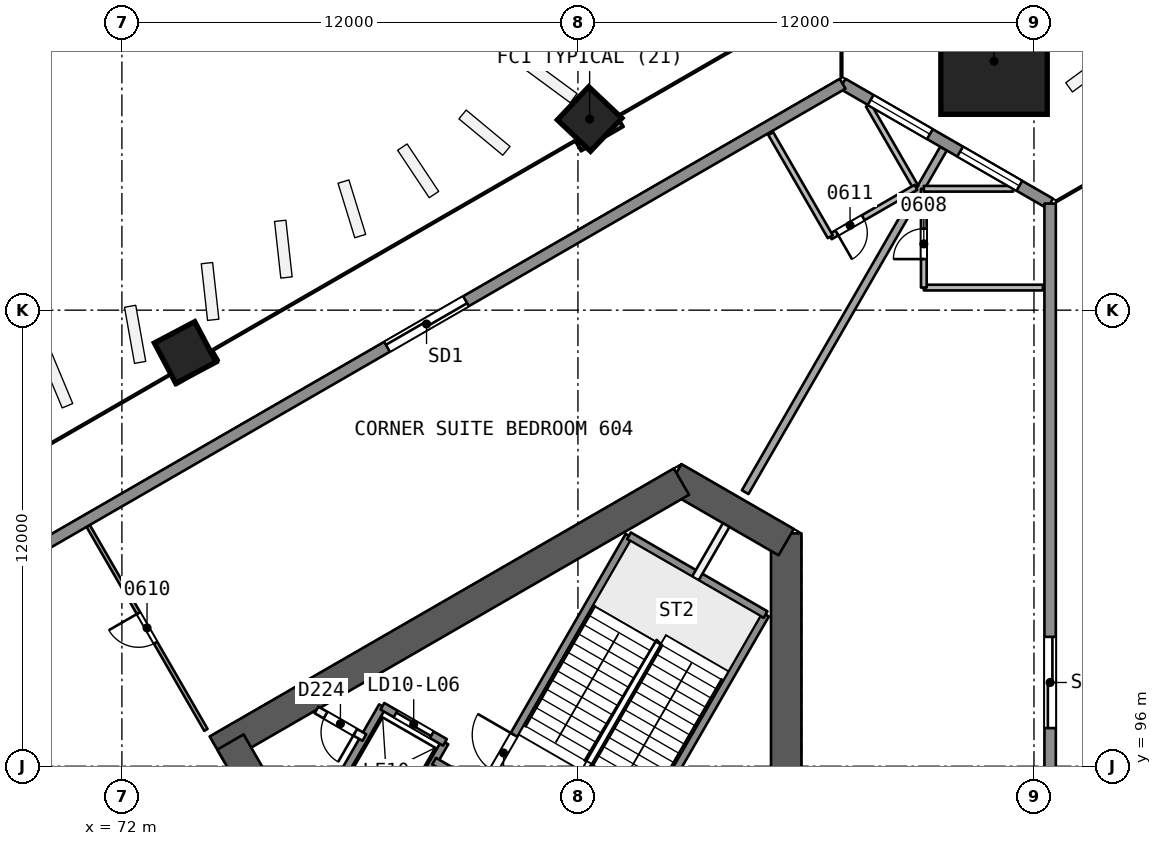
"""IFC4 building model, lengths in metres.
Left out: names, types, materials, properties, quantities, classifications, styles, units other than length and angle.
Written with IfcOpenShell. Run it as: python <this file> out.ifc"""

import sys

from ifc_helpers import new_model, si_unit, direction, frame, frame_2d, origin, origin_2d, place, context, subcontext, project, spatial, rectangle, extrude, element, fill, save


model = new_model("IFC4")
c1 = context("Model", 3, precision=1e-05, world=origin(), true_north=direction((0.0, 1.0)))
c2 = subcontext(c1, "Body", "Model", "MODEL_VIEW")
j1 = project(units=[si_unit("LENGTHUNIT", "METRE"), si_unit("PLANEANGLEUNIT", "RADIAN")], contexts=[c1])
p1 = place(None, origin())
s1 = spatial("IfcSite", under=j1, at=p1, CompositionType="ELEMENT")
p2 = place(p1, origin())
s2 = spatial("IfcBuilding", under=s1, at=p2, CompositionType="ELEMENT")
p3 = place(p2, frame((0.0, 0.0, 33.7)))
s3 = spatial("IfcBuildingStorey", under=s2, at=p3, CompositionType="ELEMENT", Elevation=33.7)
p4 = place(p3, frame((89.48, 88.194, 0.0), z_axis=(0.0, 0.0, 1.0), x_axis=(0.0, 1.0, 0.0)))
e1 = element("IfcWall", 1, at=p4, inside=s3, PredefinedType="SHEAR", context=c2, shape_type="SweptSolid", body=[
    extrude(rectangle(XDim=13.933, YDim=0.8, at=frame_2d((6.967, 0.0))), origin(), (0.0, 0.0, 1.0), 3.7),
])
p5 = place(p3, frame((89.48, 101.897, 0.0), z_axis=(0.0, 0.0, 1.0), x_axis=(-0.866034355626, 0.499984494636, 0.0)))
e2 = element("IfcWall", 2, at=p5, inside=s3, PredefinedType="SHEAR", context=c2, shape_type="SweptSolid", body=[
    extrude(rectangle(XDim=3.414, YDim=0.8, at=frame_2d((1.707, 0.0))), origin(), (0.0, 0.0, 1.0), 3.7),
])
p6 = place(p3, frame((86.723, 103.488, 0.0), z_axis=(0.0, 0.0, 1.0), x_axis=(-0.866032504327, -0.499987701298, 0.0)))
e3 = element("IfcWall", 3, at=p6, inside=s3, PredefinedType="SHEAR", context=c2, shape_type="SweptSolid", body=[
    extrude(rectangle(XDim=14.102, YDim=0.8, at=frame_2d((7.051, 0.0))), origin(), (0.0, 0.0, 1.0), 3.7),
])
p7 = place(p3, frame((74.856, 96.637, 0.0), z_axis=(0.0, 0.0, 1.0), x_axis=(0.499993500917, -0.866029155999, 0.0)))
e4 = element("IfcWall", 4, at=p7, inside=s3, PredefinedType="SHEAR", context=c2, shape_type="SweptSolid", body=[
    extrude(rectangle(XDim=9.98, YDim=0.8, at=frame_2d((4.99, 0.0))), origin(), (0.0, 0.0, 1.0), 3.7),
])
p8 = place(p7, frame((7.83, 0.0, 0.0)))
e5 = element("IfcOpeningElement", 5, at=p8, cuts=e4, PredefinedType="OPENING", context=c2, shape_type="SweptSolid", body=[
    extrude(rectangle(XDim=1.2, YDim=2.1, at=frame_2d((0.6, 1.05))), frame((0.0, 0.411, 0.0), z_axis=(0.0, -1.0, 0.0), x_axis=(1.0, 0.0, 0.0)), (0.0, 0.0, 1.0), 0.821),
])
p9 = place(p3, frame((94.97, 114.59, 0.0), z_axis=(-0.017607001884, -0.030531992032, 0.999378702468), x_axis=(0.866279052578, -0.499560409824, 2.461e-09)))
e6 = element("IfcColumn", 6, at=p9, inside=s3, PredefinedType="COLUMN", context=c2, shape_type="SweptSolid", body=[
    extrude(rectangle(XDim=2.8, YDim=2.8, at=origin_2d()), origin(), (0.0, 0.0, 1.0), 3.702),
])
p10 = place(p3, frame((84.318, 113.064, 0.0), z_axis=(-0.00837646992, -0.028097450282, 0.999570091609), x_axis=(0.866168540849, 0.499298149106, 0.021293593943)))
e7 = element("IfcColumn", 7, at=p10, inside=s3, PredefinedType="COLUMN", context=c2, shape_type="SweptSolid", body=[
    extrude(rectangle(XDim=1.2, YDim=1.2, at=origin_2d()), origin(), (0.0, 0.0, 1.0), 3.702),
])
p11 = place(p3, frame((73.665, 106.914, 0.0), z_axis=(0.000857578916, -0.022824792675, 0.999739112668), x_axis=(0.866054303765, 0.499836094294, 0.010668728649)))
e8 = element("IfcColumn", 8, at=p11, inside=s3, PredefinedType="COLUMN", context=c2, shape_type="SweptSolid", body=[
    extrude(rectangle(XDim=1.2, YDim=1.2, at=origin_2d()), origin(), (0.0, 0.0, 1.0), 3.701),
])
p12 = place(p3, frame((96.235, 108.594, 0.0), z_axis=(0.0, 0.0, 1.0), x_axis=(-1.0, 0.0, 0.0)))
e9 = element("IfcWall", 9, at=p12, inside=s3, PredefinedType="PARTITIONING", context=c2, shape_type="SweptSolid", body=[
    extrude(rectangle(XDim=3.134, YDim=0.15, at=frame_2d((1.567, 0.0))), origin(), (0.0, 0.0, 1.0), 3.2),
])
p13 = place(p3, frame((93.102, 108.594, 0.0), z_axis=(0.0, 0.0, 1.0), x_axis=(0.0, 1.0, 0.0)))
e10 = element("IfcWall", 10, at=p13, inside=s3, PredefinedType="PARTITIONING", context=c2, shape_type="SweptSolid", body=[
    extrude(rectangle(XDim=2.6, YDim=0.15, at=frame_2d((1.3, 0.0))), origin(), (0.0, 0.0, 1.0), 3.2),
])
p14 = place(p13, frame((0.75, 0.0, 0.0)))
e11 = element("IfcOpeningElement", 11, at=p14, cuts=e10, PredefinedType="OPENING", context=c2, shape_type="SweptSolid", body=[
    extrude(rectangle(XDim=0.8, YDim=2.1, at=frame_2d((0.4, 1.05))), frame((0.0, 0.085, 0.0), z_axis=(0.0, -1.0, 0.0), x_axis=(1.0, 0.0, 0.0)), (0.0, 0.0, 1.0), 0.171),
])
p15 = place(p3, frame((93.102, 111.194, 0.0), z_axis=(0.0, 0.0, 1.0), x_axis=(1.0, 0.0, 0.0)))
e12 = element("IfcWall", 12, at=p15, inside=s3, PredefinedType="PARTITIONING", context=c2, shape_type="SweptSolid", body=[
    extrude(rectangle(XDim=2.352, YDim=0.15, at=frame_2d((1.176, 0.0))), origin(), (0.0, 0.0, 1.0), 3.2),
])
p16 = place(p3, frame((93.621, 112.252, 0.0), z_axis=(0.0, 0.0, 1.0), x_axis=(-0.499992367345, -0.866029810455, 0.0)))
e13 = element("IfcWall", 13, at=p16, inside=s3, PredefinedType="PARTITIONING", context=c2, shape_type="SweptSolid", body=[
    extrude(rectangle(XDim=10.44, YDim=0.2, at=frame_2d((5.22, 0.0))), origin(), (0.0, 0.0, 1.0), 3.2),
])
p17 = place(p3, frame((74.21, 96.956, 0.0), z_axis=(0.0, 0.0, 1.0), x_axis=(-0.499986163319, 0.866033392248, 0.0)))
e14 = element("IfcWall", 14, at=p17, inside=s3, PredefinedType="PARTITIONING", context=c2, shape_type="SweptSolid", body=[
    extrude(rectangle(XDim=6.198, YDim=0.1, at=frame_2d((3.099, 0.0))), origin(), (0.0, 0.0, 1.0), 3.2),
])
p18 = place(p17, frame((2.649, 0.0, 0.0)))
e15 = element("IfcOpeningElement", 15, at=p18, cuts=e14, PredefinedType="OPENING", context=c2, shape_type="SweptSolid", body=[
    extrude(rectangle(XDim=0.9, YDim=2.1, at=frame_2d((0.45, 1.05))), frame((0.0, 0.061, 0.0), z_axis=(0.0, -1.0, 0.0), x_axis=(1.0, 0.0, 0.0)), (0.0, 0.0, 1.0), 0.121),
])
p19 = place(p3, frame((65.712, 99.205, 0.0), z_axis=(0.0, 0.0, 1.0), x_axis=(0.499997249004, -0.866026992067, 0.0)))
e16 = element("IfcWall", 16, at=p19, inside=s3, PredefinedType="PARTITIONING", context=c2, shape_type="SweptSolid", body=[
    extrude(rectangle(XDim=14.176, YDim=0.2, at=frame_2d((7.088, 0.0))), origin(), (0.0, 0.0, 1.0), 3.2),
])
p20 = place(p3, frame((91.644, 113.393, 0.0), z_axis=(0.0, 0.0, 1.0), x_axis=(0.500021675881, -0.866012888847, 0.0)))
e17 = element("IfcWall", 17, at=p20, inside=s3, PredefinedType="PARTITIONING", context=c2, shape_type="SweptSolid", body=[
    extrude(rectangle(XDim=2.496, YDim=0.15, at=frame_2d((1.248, 0.0))), origin(), (0.0, 0.0, 1.0), 3.2),
])
p21 = place(p3, frame((92.892, 111.232, 0.0), z_axis=(0.0, 0.0, 1.0), x_axis=(-0.866021400173, -0.500006934395, 0.0)))
e18 = element("IfcWall", 18, at=p21, inside=s3, PredefinedType="PARTITIONING", context=c2, shape_type="SweptSolid", body=[
    extrude(rectangle(XDim=2.6, YDim=0.15, at=frame_2d((1.3, 0.0))), origin(), (0.0, 0.0, 1.0), 3.2),
])
p22 = place(p21, frame((1.6, 0.0, 0.0)))
e19 = element("IfcOpeningElement", 19, at=p22, cuts=e18, PredefinedType="OPENING", context=c2, shape_type="SweptSolid", body=[
    extrude(rectangle(XDim=0.8, YDim=2.1, at=frame_2d((0.4, 1.05))), frame((0.0, 0.085, 0.0), z_axis=(0.0, -1.0, 0.0), x_axis=(1.0, 0.0, 0.0)), (0.0, 0.0, 1.0), 0.171),
])
p23 = place(p3, frame((90.64, 109.932, 0.0), z_axis=(0.0, 0.0, 1.0), x_axis=(-0.499951757484, 0.866053254822, 0.0)))
e20 = element("IfcWall", 20, at=p23, inside=s3, PredefinedType="PARTITIONING", context=c2, shape_type="SweptSolid", body=[
    extrude(rectangle(XDim=3.134, YDim=0.15, at=frame_2d((1.567, 0.0))), origin(), (0.0, 0.0, 1.0), 3.2),
])
p24 = place(p3, frame((90.965, 113.957, 0.0), z_axis=(0.0, 0.0, 1.0), x_axis=(0.866032760736, -0.49998725717, 0.0)))
e21 = element("IfcWall", 21, at=p24, inside=s3, PredefinedType="SOLIDWALL", context=c2, shape_type="SweptSolid", body=[
    extrude(rectangle(XDim=6.305, YDim=0.3, at=frame_2d((3.152, 0.0))), origin(), (0.0, 0.0, 1.0), 3.2),
])
p25 = place(p24, frame((3.57, 0.0, 0.9)))
e22 = element("IfcOpeningElement", 22, at=p25, cuts=e21, PredefinedType="OPENING", context=c2, shape_type="SweptSolid", body=[
    extrude(rectangle(XDim=1.8, YDim=1.5, at=frame_2d((0.9, 0.75))), frame((0.0, 0.161, 0.0), z_axis=(0.0, -1.0, 0.0), x_axis=(1.0, 0.0, 0.0)), (0.0, 0.0, 1.0), 0.321),
])
p26 = place(p24, frame((0.852, 0.0, 0.9)))
e23 = element("IfcOpeningElement", 23, at=p26, cuts=e21, PredefinedType="OPENING", context=c2, shape_type="SweptSolid", body=[
    extrude(rectangle(XDim=1.8, YDim=1.5, at=frame_2d((0.9, 0.75))), frame((0.0, 0.161, 0.0), z_axis=(0.0, -1.0, 0.0), x_axis=(1.0, 0.0, 0.0)), (0.0, 0.0, 1.0), 0.321),
])
p27 = place(p3, frame((96.425, 110.805, 0.0), z_axis=(0.0, 0.0, 1.0), x_axis=(0.0, -1.0, 0.0)))
e24 = element("IfcWall", 24, at=p27, inside=s3, PredefinedType="SOLIDWALL", context=c2, shape_type="SweptSolid", body=[
    extrude(rectangle(XDim=61.61, YDim=0.3, at=frame_2d((30.805, 0.0))), origin(), (0.0, 0.0, 1.0), 3.2),
])
p28 = place(p27, frame((29.605, 0.0, 0.0)))
e25 = element("IfcOpeningElement", 25, at=p28, cuts=e24, PredefinedType="OPENING", context=c2, shape_type="SweptSolid", body=[
    extrude(rectangle(XDim=2.4, YDim=2.4, at=frame_2d((1.2, 1.2))), frame((0.0, 0.161, 0.0), z_axis=(0.0, -1.0, 0.0), x_axis=(1.0, 0.0, 0.0)), (0.0, 0.0, 1.0), 0.321),
])
p29 = place(p27, frame((34.437, 0.0, 0.0)))
e26 = element("IfcOpeningElement", 26, at=p29, cuts=e24, PredefinedType="OPENING", context=c2, shape_type="SweptSolid", body=[
    extrude(rectangle(XDim=2.4, YDim=2.4, at=frame_2d((1.2, 1.2))), frame((0.0, 0.161, 0.0), z_axis=(0.0, -1.0, 0.0), x_axis=(1.0, 0.0, 0.0)), (0.0, 0.0, 1.0), 0.321),
])
p30 = place(p27, frame((47.767, 0.0, 0.0)))
e27 = element("IfcOpeningElement", 27, at=p30, cuts=e24, PredefinedType="OPENING", context=c2, shape_type="SweptSolid", body=[
    extrude(rectangle(XDim=2.4, YDim=2.4, at=frame_2d((1.2, 1.2))), frame((0.0, 0.161, 0.0), z_axis=(0.0, -1.0, 0.0), x_axis=(1.0, 0.0, 0.0)), (0.0, 0.0, 1.0), 0.321),
])
p31 = place(p27, frame((24.772, 0.0, 0.0)))
e28 = element("IfcOpeningElement", 28, at=p31, cuts=e24, PredefinedType="OPENING", context=c2, shape_type="SweptSolid", body=[
    extrude(rectangle(XDim=2.4, YDim=2.4, at=frame_2d((1.2, 1.2))), frame((0.0, 0.161, 0.0), z_axis=(0.0, -1.0, 0.0), x_axis=(1.0, 0.0, 0.0)), (0.0, 0.0, 1.0), 0.321),
])
p32 = place(p27, frame((11.402, 0.0, 0.0)))
e29 = element("IfcOpeningElement", 29, at=p32, cuts=e24, PredefinedType="OPENING", context=c2, shape_type="SweptSolid", body=[
    extrude(rectangle(XDim=2.4, YDim=2.4, at=frame_2d((1.2, 1.2))), frame((0.0, 0.161, 0.0), z_axis=(0.0, -1.0, 0.0), x_axis=(1.0, 0.0, 0.0)), (0.0, 0.0, 1.0), 0.321),
])
p33 = place(p3, frame((37.61, 83.152, 0.0), z_axis=(0.0, 0.0, 1.0), x_axis=(0.866024438126, 0.500001672566, 0.0)))
e30 = element("IfcWall", 30, at=p33, inside=s3, PredefinedType="SOLIDWALL", context=c2, shape_type="SweptSolid", body=[
    extrude(rectangle(XDim=61.61, YDim=0.3, at=frame_2d((30.805, 0.0))), origin(), (0.0, 0.0, 1.0), 3.2),
])
p34 = place(p33, frame((34.281, 0.0, 0.0)))
e31 = element("IfcOpeningElement", 31, at=p34, cuts=e30, PredefinedType="OPENING", context=c2, shape_type="SweptSolid", body=[
    extrude(rectangle(XDim=2.4, YDim=2.4, at=frame_2d((1.2, 1.2))), frame((0.0, 0.161, 0.0), z_axis=(0.0, -1.0, 0.0), x_axis=(1.0, 0.0, 0.0)), (0.0, 0.0, 1.0), 0.321),
])
p35 = place(p33, frame((47.767, 0.0, 0.0)))
e32 = element("IfcOpeningElement", 32, at=p35, cuts=e30, PredefinedType="OPENING", context=c2, shape_type="SweptSolid", body=[
    extrude(rectangle(XDim=2.4, YDim=2.4, at=frame_2d((1.2, 1.2))), frame((0.0, 0.161, 0.0), z_axis=(0.0, -1.0, 0.0), x_axis=(1.0, 0.0, 0.0)), (0.0, 0.0, 1.0), 0.321),
])
p36 = place(p33, frame((24.305, 0.0, 0.0)))
e33 = element("IfcOpeningElement", 33, at=p36, cuts=e30, PredefinedType="OPENING", context=c2, shape_type="SweptSolid", body=[
    extrude(rectangle(XDim=2.4, YDim=2.4, at=frame_2d((1.2, 1.2))), frame((0.0, 0.161, 0.0), z_axis=(0.0, -1.0, 0.0), x_axis=(1.0, 0.0, 0.0)), (0.0, 0.0, 1.0), 0.321),
])
p37 = place(p33, frame((11.402, 0.0, 0.0)))
e34 = element("IfcOpeningElement", 34, at=p37, cuts=e30, PredefinedType="OPENING", context=c2, shape_type="SweptSolid", body=[
    extrude(rectangle(XDim=2.4, YDim=2.4, at=frame_2d((1.2, 1.2))), frame((0.0, 0.161, 0.0), z_axis=(0.0, -1.0, 0.0), x_axis=(1.0, 0.0, 0.0)), (0.0, 0.0, 1.0), 0.321),
])
p38 = place(p33, frame((28.981, 0.0, 0.0)))
e35 = element("IfcOpeningElement", 35, at=p38, cuts=e30, PredefinedType="OPENING", context=c2, shape_type="SweptSolid", body=[
    extrude(rectangle(XDim=2.4, YDim=2.4, at=frame_2d((1.2, 1.2))), frame((0.0, 0.161, 0.0), z_axis=(0.0, -1.0, 0.0), x_axis=(1.0, 0.0, 0.0)), (0.0, 0.0, 1.0), 0.321),
])
p39 = place(p3, frame((85.087, 93.321, 0.0), z_axis=(0.0, 0.0, 1.0), x_axis=(0.500019787375, 0.866013979237, 0.0)))
e36 = element("IfcWall", 36, at=p39, inside=s3, PredefinedType="SOLIDWALL", context=c2, shape_type="SweptSolid", body=[
    extrude(rectangle(XDim=7.7, YDim=0.2, at=frame_2d((3.85, 0.0))), origin(), (0.0, 0.0, 1.0), 3.2),
])
p40 = place(p3, frame((87.09, 100.94, 0.0), z_axis=(0.0, 0.0, 1.0), x_axis=(0.499956811548, 0.866050337213, 0.0)))
e37 = element("IfcWall", 37, at=p40, inside=s3, PredefinedType="PARTITIONING", context=c2, shape_type="SweptSolid", body=[
    extrude(rectangle(XDim=1.623, YDim=0.2, at=frame_2d((0.812, 0.0))), origin(), (0.0, 0.0, 1.0), 3.2),
])
p41 = place(p3, frame((81.493, 95.396, 0.0), z_axis=(0.0, 0.0, 1.0), x_axis=(0.500006057782, 0.866021906294, 0.0)))
e38 = element("IfcWall", 38, at=p41, inside=s3, PredefinedType="SOLIDWALL", context=c2, shape_type="SweptSolid", body=[
    extrude(rectangle(XDim=7.7, YDim=0.2, at=frame_2d((3.85, 0.0))), origin(), (0.0, 0.0, 1.0), 3.2),
])
p42 = place(p41, frame((0.55, 0.0, 0.0)))
e39 = element("IfcOpeningElement", 39, at=p42, cuts=e38, PredefinedType="OPENING", context=c2, shape_type="SweptSolid", body=[
    extrude(rectangle(XDim=1.1, YDim=2.1, at=frame_2d((0.55, 1.05))), frame((0.0, 0.11, 0.0), z_axis=(0.0, -1.0, 0.0), x_axis=(1.0, 0.0, 0.0)), (0.0, 0.0, 1.0), 0.221),
])
for number, where, z_axis, x_axis in (
    (40, (78.976, 93.986, 0.0), (0.0, 0.0, 1.0), (0.5, 0.866, 0.0)),
    (41, (77.33, 94.936, 0.0), (0.0, 0.0, 1.0), (0.5, 0.866, 0.0)),
):
    element("IfcWall", number, at=place(p3, frame(where, z_axis=z_axis, x_axis=x_axis)), inside=s3, PredefinedType="SOLIDWALL", context=c2, shape_type="SweptSolid", body=[
        extrude(rectangle(XDim=3.05, YDim=0.2, at=frame_2d((1.525, 0.0))), origin(), (0.0, 0.0, 1.0), 3.2),
    ])
p43 = place(p3, frame((78.38, 96.755, 0.0), z_axis=(0.0, 0.0, 1.0), x_axis=(-0.866003949776, 0.500037157592, 0.0)))
e42 = element("IfcWall", 42, at=p43, inside=s3, PredefinedType="PARTITIONING", context=c2, shape_type="SweptSolid", body=[
    extrude(rectangle(XDim=1.455, YDim=0.2, at=frame_2d((0.728, 0.0))), origin(), (0.0, 0.0, 1.0), 3.2),
])
p44 = place(p43, frame((0.278, 0.0, 0.0)))
e43 = element("IfcOpeningElement", 43, at=p44, cuts=e42, PredefinedType="OPENING", context=c2, shape_type="SweptSolid", body=[
    extrude(rectangle(XDim=0.9, YDim=2.1, at=frame_2d((0.45, 1.05))), frame((0.0, 0.11, 0.0), z_axis=(0.0, -1.0, 0.0), x_axis=(1.0, 0.0, 0.0)), (0.0, 0.0, 1.0), 0.221),
])
p45 = place(p3, frame((88.01, 91.634, 0.0), z_axis=(0.0, 0.0, 1.0), x_axis=(-0.866024315419, 0.5000018851, 0.0)))
e44 = element("IfcWall", 44, at=p45, inside=s3, PredefinedType="SOLIDWALL", context=c2, shape_type="SweptSolid", body=[
    extrude(rectangle(XDim=9.0, YDim=0.2, at=frame_2d((4.5, 0.0))), origin(), (0.0, 0.0, 1.0), 3.2),
])
p46 = place(p3, frame((80.5, 96.627, 0.0), z_axis=(0.0, 0.0, 1.0), x_axis=(-0.86601224135, 0.500022797313, 0.0)))
e45 = element("IfcWall", 45, at=p46, inside=s3, PredefinedType="SOLIDWALL", context=c2, shape_type="SweptSolid", body=[
    extrude(rectangle(XDim=1.9, YDim=0.2, at=frame_2d((0.95, 0.0))), origin(), (0.0, 0.0, 1.0), 3.2),
])
p47 = place(p46, frame((0.4, 0.0, 0.0)))
e46 = element("IfcOpeningElement", 46, at=p47, cuts=e45, PredefinedType="OPENING", context=c2, shape_type="SweptSolid", body=[
    extrude(rectangle(XDim=1.1, YDim=2.1, at=frame_2d((0.55, 1.05))), frame((0.0, 0.11, 0.0), z_axis=(0.0, -1.0, 0.0), x_axis=(1.0, 0.0, 0.0)), (0.0, 0.0, 1.0), 0.221),
])
p48 = place(p3, frame((88.937, 99.99, 0.0), z_axis=(0.0, 0.0, 1.0), x_axis=(-0.866004344652, 0.500036473714, 0.0)))
e47 = element("IfcWall", 47, at=p48, inside=s3, PredefinedType="SOLIDWALL", context=c2, shape_type="SweptSolid", body=[
    extrude(rectangle(XDim=4.15, YDim=0.2, at=frame_2d((2.075, 0.0))), origin(), (0.0, 0.0, 1.0), 3.2),
])
p49 = place(p14, origin())
e48 = element("IfcDoor", 48, at=p49, inside=s3, OperationType="SINGLE_SWING_LEFT", PredefinedType="NOTDEFINED", context=c2, shape_type="SweptSolid", body=[
    extrude(rectangle(XDim=0.8, YDim=2.1, at=frame_2d((0.4, 1.05))), frame((0.0, 0.025, 0.0), z_axis=(0.0, -1.0, 0.0), x_axis=(1.0, 0.0, 0.0)), (0.0, 0.0, 1.0), 0.05),
])
fill(e11, e48)
p50 = place(p18, origin())
e49 = element("IfcDoor", 49, at=p50, inside=s3, OperationType="SINGLE_SWING_RIGHT", PredefinedType="NOTDEFINED", context=c2, shape_type="SweptSolid", body=[
    extrude(rectangle(XDim=0.9, YDim=2.1, at=frame_2d((0.45, 1.05))), frame((0.0, 0.025, 0.0), z_axis=(0.0, -1.0, 0.0), x_axis=(1.0, 0.0, 0.0)), (0.0, 0.0, 1.0), 0.05),
])
fill(e15, e49)
p51 = place(p22, origin())
e50 = element("IfcDoor", 50, at=p51, inside=s3, OperationType="SINGLE_SWING_RIGHT", PredefinedType="NOTDEFINED", context=c2, shape_type="SweptSolid", body=[
    extrude(rectangle(XDim=0.8, YDim=2.1, at=frame_2d((0.4, 1.05))), frame((0.0, 0.025, 0.0), z_axis=(0.0, -1.0, 0.0), x_axis=(1.0, 0.0, 0.0)), (0.0, 0.0, 1.0), 0.05),
])
fill(e19, e50)
p52 = place(p25, origin())
e51 = element("IfcWindow", 51, at=p52, inside=s3, PartitioningType="SINGLE_PANEL", PredefinedType="WINDOW", context=c2, shape_type="SweptSolid", body=[
    extrude(rectangle(XDim=1.8, YDim=1.5, at=frame_2d((0.9, 0.75))), frame((0.0, 0.03, 0.0), z_axis=(0.0, -1.0, 0.0), x_axis=(1.0, 0.0, 0.0)), (0.0, 0.0, 1.0), 0.06),
])
fill(e22, e51)
p53 = place(p26, origin())
e52 = element("IfcWindow", 52, at=p53, inside=s3, PartitioningType="SINGLE_PANEL", PredefinedType="WINDOW", context=c2, shape_type="SweptSolid", body=[
    extrude(rectangle(XDim=1.8, YDim=1.5, at=frame_2d((0.9, 0.75))), frame((0.0, 0.03, 0.0), z_axis=(0.0, -1.0, 0.0), x_axis=(1.0, 0.0, 0.0)), (0.0, 0.0, 1.0), 0.06),
])
fill(e23, e52)
p54 = place(p32, origin())
e53 = element("IfcDoor", 53, at=p54, inside=s3, OperationType="SLIDING_TO_LEFT", PredefinedType="NOTDEFINED", context=c2, shape_type="SweptSolid", body=[
    extrude(rectangle(XDim=2.4, YDim=2.4, at=frame_2d((1.2, 1.2))), frame((0.0, 0.025, 0.0), z_axis=(0.0, -1.0, 0.0), x_axis=(1.0, 0.0, 0.0)), (0.0, 0.0, 1.0), 0.05),
])
fill(e29, e53)
p55 = place(p35, origin())
e54 = element("IfcDoor", 54, at=p55, inside=s3, OperationType="SLIDING_TO_RIGHT", PredefinedType="NOTDEFINED", context=c2, shape_type="SweptSolid", body=[
    extrude(rectangle(XDim=2.4, YDim=2.4, at=frame_2d((1.2, 1.2))), frame((0.0, 0.025, 0.0), z_axis=(0.0, -1.0, 0.0), x_axis=(1.0, 0.0, 0.0)), (0.0, 0.0, 1.0), 0.05),
])
fill(e32, e54)
p56 = place(p47, origin())
e55 = element("IfcDoor", 55, at=p56, inside=s3, OperationType="SLIDING_TO_RIGHT", PredefinedType="NOTDEFINED", context=c2, shape_type="SweptSolid", body=[
    extrude(rectangle(XDim=1.1, YDim=2.1, at=frame_2d((0.55, 1.05))), frame((0.0, 0.025, 0.0), z_axis=(0.0, -1.0, 0.0), x_axis=(1.0, 0.0, 0.0)), (0.0, 0.0, 1.0), 0.05),
])
fill(e46, e55)
p57 = place(p44, origin())
e56 = element("IfcDoor", 56, at=p57, inside=s3, OperationType="SINGLE_SWING_LEFT", PredefinedType="NOTDEFINED", context=c2, shape_type="SweptSolid", body=[
    extrude(rectangle(XDim=0.9, YDim=2.1, at=frame_2d((0.45, 1.05))), frame((0.0, 0.025, 0.0), z_axis=(0.0, -1.0, 0.0), x_axis=(1.0, 0.0, 0.0)), (0.0, 0.0, 1.0), 0.05),
])
fill(e43, e56)
p58 = place(p42, origin())
e57 = element("IfcDoor", 57, at=p58, inside=s3, OperationType="SINGLE_SWING_RIGHT", PredefinedType="NOTDEFINED", context=c2, shape_type="SweptSolid", body=[
    extrude(rectangle(XDim=1.1, YDim=2.1, at=frame_2d((0.55, 1.05))), frame((0.0, 0.025, 0.0), z_axis=(0.0, -1.0, 0.0), x_axis=(1.0, 0.0, 0.0)), (0.0, 0.0, 1.0), 0.05),
])
fill(e39, e57)
save(model, sys.argv[1])
